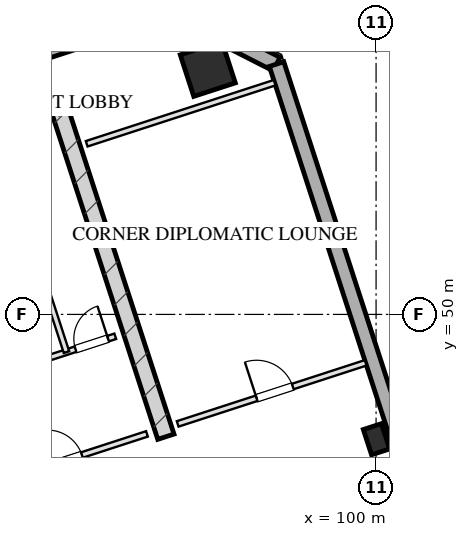
"""IFC4 building model, lengths in metres.
Left out: names, types, materials, properties, quantities, classifications, styles, units other than length and angle.
Written with IfcOpenShell. Run it as: python <this file> out.ifc"""

import sys

from ifc_helpers import new_model, si_unit, direction, frame, frame_2d, origin, origin_2d, place, context, subcontext, project, spatial, rectangle, hollow_rectangle, extrude, element, fill, save


model = new_model("IFC4")
c1 = context("Model", 3, precision=1e-05, world=origin(), true_north=direction((0.0, 1.0)))
c2 = subcontext(c1, "Body", "Model", "MODEL_VIEW")
j1 = project(units=[si_unit("LENGTHUNIT", "METRE"), si_unit("PLANEANGLEUNIT", "RADIAN")], contexts=[c1])
p1 = place(None, origin())
s1 = spatial("IfcSite", under=j1, at=p1, CompositionType="ELEMENT")
p2 = place(p1, origin())
s2 = spatial("IfcBuilding", under=s1, at=p2, CompositionType="ELEMENT")
p3 = place(p2, frame((0.0, 0.0, 234.4)))
s3 = spatial("IfcBuildingStorey", under=s2, at=p3, CompositionType="ELEMENT", Elevation=234.4)
p4 = place(p3, frame((76.415, 50.489, 0.0), z_axis=(0.0, 0.0, 1.0), x_axis=(0.951056810414, 0.309016089169, 0.0)))
e1 = element("IfcWall", 1, at=p4, inside=s3, PredefinedType="SHEAR", context=c2, shape_type="SweptSolid", body=[
    extrude(rectangle(XDim=16.25, YDim=0.45, at=frame_2d((8.125, 0.0))), origin(), (0.0, 0.0, 1.0), 3.2),
])
p5 = place(p3, frame((94.469, 46.781, 0.0), z_axis=(0.0, 0.0, 1.0), x_axis=(-0.309004419953, 0.951060601881, 0.0)))
e2 = element("IfcWall", 2, at=p5, inside=s3, PredefinedType="SHEAR", context=c2, shape_type="SweptSolid", body=[
    extrude(rectangle(XDim=9.33, YDim=0.45, at=frame_2d((4.665, 0.0))), origin(), (0.0, 0.0, 1.0), 3.2),
])
p6 = place(p3, frame((95.572, 56.461, 0.0), z_axis=(0.0, 0.0, 1.0), x_axis=(0.951056516295, 0.309016994375, 0.0)))
e3 = element("IfcColumn", 3, at=p6, inside=s3, PredefinedType="COLUMN", context=c2, shape_type="SweptSolid", body=[
    extrude(hollow_rectangle(XDim=1.15, YDim=1.15, WallThickness=0.04, at=origin_2d()), origin(), (0.0, 0.0, 1.0), 3.201),
])
p7 = place(p3, frame((100.01, 46.716, 0.0), z_axis=(0.0, 0.0, 1.0), x_axis=(0.951056516295, 0.309016994375, 0.0)))
e4 = element("IfcColumn", 4, at=p7, inside=s3, PredefinedType="COLUMN", context=c2, shape_type="SweptSolid", body=[
    extrude(hollow_rectangle(XDim=0.5, YDim=0.7, WallThickness=0.025, at=origin_2d()), origin(), (0.0, 0.0, 1.0), 3.201),
])
p8 = place(p3, frame((72.165, 50.706, 0.0), z_axis=(0.0, 0.0, 1.0), x_axis=(0.951058012937, 0.309012388148, 0.0)))
e5 = element("IfcWall", 5, at=p8, inside=s3, PredefinedType="SOLIDWALL", context=c2, shape_type="SweptSolid", body=[
    extrude(rectangle(XDim=23.6, YDim=0.4, at=frame_2d((11.8, 0.0))), origin(), (0.0, 0.0, 1.0), 2.36),
])
p9 = place(p3, frame((94.61, 57.999, 0.0), z_axis=(0.0, 0.0, 1.0), x_axis=(0.890979603174, -0.454043331334, 0.0)))
e6 = element("IfcWall", 6, at=p9, inside=s3, PredefinedType="SOLIDWALL", context=c2, shape_type="SweptSolid", body=[
    extrude(rectangle(XDim=3.111, YDim=0.4, at=frame_2d((1.556, 0.0))), origin(), (0.0, 0.0, 1.0), 2.36),
])
p10 = place(p3, frame((97.382, 56.586, 0.0), z_axis=(0.0, 0.0, 1.0), x_axis=(0.309016491071, -0.951056679828, 0.0)))
e7 = element("IfcWall", 7, at=p10, inside=s3, PredefinedType="SOLIDWALL", context=c2, shape_type="SweptSolid", body=[
    extrude(rectangle(XDim=38.4, YDim=0.4, at=frame_2d((19.2, 0.0))), origin(), (0.0, 0.0, 1.0), 2.36),
])
p11 = place(p10, frame((24.625, 0.0, 0.75)))
e8 = element("IfcOpeningElement", 8, at=p11, cuts=e7, PredefinedType="OPENING", context=c2, shape_type="SweptSolid", body=[
    extrude(rectangle(XDim=1.95, YDim=1.21, at=frame_2d((0.975, 0.605))), frame((0.0, 0.21, 0.0), z_axis=(0.0, -1.0, 0.0), x_axis=(1.0, 0.0, 0.0)), (0.0, 0.0, 1.0), 0.42),
])
p12 = place(p10, frame((20.825, 0.0, 0.75)))
e9 = element("IfcOpeningElement", 9, at=p12, cuts=e7, PredefinedType="OPENING", context=c2, shape_type="SweptSolid", body=[
    extrude(rectangle(XDim=1.95, YDim=1.21, at=frame_2d((0.975, 0.605))), frame((0.0, 0.21, 0.0), z_axis=(0.0, -1.0, 0.0), x_axis=(1.0, 0.0, 0.0)), (0.0, 0.0, 1.0), 0.42),
])
p13 = place(p10, frame((15.625, 0.0, 0.75)))
e10 = element("IfcOpeningElement", 10, at=p13, cuts=e7, PredefinedType="OPENING", context=c2, shape_type="SweptSolid", body=[
    extrude(rectangle(XDim=1.95, YDim=1.21, at=frame_2d((0.975, 0.605))), frame((0.0, 0.21, 0.0), z_axis=(0.0, -1.0, 0.0), x_axis=(1.0, 0.0, 0.0)), (0.0, 0.0, 1.0), 0.42),
])
p14 = place(p10, frame((11.825, 0.0, 0.75)))
e11 = element("IfcOpeningElement", 11, at=p14, cuts=e7, PredefinedType="OPENING", context=c2, shape_type="SweptSolid", body=[
    extrude(rectangle(XDim=1.95, YDim=1.21, at=frame_2d((0.975, 0.605))), frame((0.0, 0.21, 0.0), z_axis=(0.0, -1.0, 0.0), x_axis=(1.0, 0.0, 0.0)), (0.0, 0.0, 1.0), 0.42),
])
p15 = place(p3, frame((90.928, 45.868, 0.0), z_axis=(0.0, 0.0, 1.0), x_axis=(0.951059297078, 0.309008435874, 0.0)))
e12 = element("IfcWall", 12, at=p15, inside=s3, PredefinedType="PARTITIONING", context=c2, shape_type="SweptSolid", body=[
    extrude(rectangle(XDim=3.2, YDim=0.15, at=frame_2d((1.6, 0.0))), origin(), (0.0, 0.0, 1.0), 2.925),
])
p16 = place(p15, frame((0.45, 0.0, 0.0)))
e13 = element("IfcOpeningElement", 13, at=p16, cuts=e12, PredefinedType="OPENING", context=c2, shape_type="SweptSolid", body=[
    extrude(rectangle(XDim=0.95, YDim=2.05, at=frame_2d((0.475, 1.025))), frame((0.0, 0.085, 0.0), z_axis=(0.0, -1.0, 0.0), x_axis=(1.0, 0.0, 0.0)), (0.0, 0.0, 1.0), 0.17),
])
p17 = place(p3, frame((90.094, 48.436, 0.0), z_axis=(0.0, 0.0, 1.0), x_axis=(0.951066581729, 0.308986014439, 0.0)))
e14 = element("IfcWall", 14, at=p17, inside=s3, PredefinedType="PARTITIONING", context=c2, shape_type="SweptSolid", body=[
    extrude(rectangle(XDim=3.2, YDim=0.15, at=frame_2d((1.6, 0.0))), origin(), (0.0, 0.0, 1.0), 2.925),
])
p18 = place(p17, frame((0.35, 0.0, 0.0)))
e15 = element("IfcOpeningElement", 15, at=p18, cuts=e14, PredefinedType="OPENING", context=c2, shape_type="SweptSolid", body=[
    extrude(rectangle(XDim=0.9, YDim=2.05, at=frame_2d((0.45, 1.025))), frame((0.0, 0.085, 0.0), z_axis=(0.0, -1.0, 0.0), x_axis=(1.0, 0.0, 0.0)), (0.0, 0.0, 1.0), 0.17),
])
p19 = place(p17, frame((2.1, 0.0, 0.0)))
e16 = element("IfcOpeningElement", 16, at=p19, cuts=e14, PredefinedType="OPENING", context=c2, shape_type="SweptSolid", body=[
    extrude(rectangle(XDim=0.9, YDim=2.05, at=frame_2d((0.45, 1.025))), frame((0.0, 0.085, 0.0), z_axis=(0.0, -1.0, 0.0), x_axis=(1.0, 0.0, 0.0)), (0.0, 0.0, 1.0), 0.17),
])
p20 = place(p3, frame((91.853, 49.007, 0.0), z_axis=(0.0, 0.0, 1.0), x_axis=(-0.309022487551, 0.951054731437, 0.0)))
e17 = element("IfcWall", 17, at=p20, inside=s3, PredefinedType="PARTITIONING", context=c2, shape_type="SweptSolid", body=[
    extrude(rectangle(XDim=5.73, YDim=0.15, at=frame_2d((2.865, 0.0))), origin(), (0.0, 0.0, 1.0), 2.925),
])
p21 = place(p3, frame((92.385, 54.49, 0.0), z_axis=(0.0, 0.0, 1.0), x_axis=(0.951055112834, 0.309021313752, 0.0)))
e18 = element("IfcWall", 18, at=p21, inside=s3, PredefinedType="PARTITIONING", context=c2, shape_type="SweptSolid", body=[
    extrude(rectangle(XDim=5.2, YDim=0.15, at=frame_2d((2.6, 0.0))), origin(), (0.0, 0.0, 1.0), 2.925),
])
p22 = place(p3, frame((94.78, 47.119, 0.0), z_axis=(0.0, 0.0, 1.0), x_axis=(0.951055112834, 0.309021313752, 0.0)))
e19 = element("IfcWall", 19, at=p22, inside=s3, PredefinedType="PARTITIONING", context=c2, shape_type="SweptSolid", body=[
    extrude(rectangle(XDim=5.2, YDim=0.15, at=frame_2d((2.6, 0.0))), origin(), (0.0, 0.0, 1.0), 2.925),
])
p23 = place(p22, frame((2.184, 0.0, 0.0)))
e20 = element("IfcOpeningElement", 20, at=p23, cuts=e19, PredefinedType="OPENING", context=c2, shape_type="SweptSolid", body=[
    extrude(rectangle(XDim=1.0, YDim=2.05, at=frame_2d((0.5, 1.025))), frame((0.0, 0.085, 0.0), z_axis=(0.0, -1.0, 0.0), x_axis=(1.0, 0.0, 0.0)), (0.0, 0.0, 1.0), 0.17),
])
p24 = place(p16, origin())
e21 = element("IfcDoor", 21, at=p24, inside=s3, OperationType="SINGLE_SWING_LEFT", PredefinedType="DOOR", context=c2, shape_type="SweptSolid", body=[
    extrude(rectangle(XDim=0.95, YDim=2.05, at=frame_2d((0.475, 1.025))), frame((0.0, 0.025, 0.0), z_axis=(0.0, -1.0, 0.0), x_axis=(1.0, 0.0, 0.0)), (0.0, 0.0, 1.0), 0.05),
])
fill(e13, e21)
p25 = place(p19, origin())
e22 = element("IfcDoor", 22, at=p25, inside=s3, OperationType="SINGLE_SWING_RIGHT", PredefinedType="DOOR", context=c2, shape_type="SweptSolid", body=[
    extrude(rectangle(XDim=0.9, YDim=2.05, at=frame_2d((0.45, 1.025))), frame((0.0, 0.025, 0.0), z_axis=(0.0, -1.0, 0.0), x_axis=(1.0, 0.0, 0.0)), (0.0, 0.0, 1.0), 0.05),
])
fill(e16, e22)
p26 = place(p23, origin())
e23 = element("IfcDoor", 23, at=p26, inside=s3, OperationType="SINGLE_SWING_LEFT", PredefinedType="DOOR", context=c2, shape_type="SweptSolid", body=[
    extrude(rectangle(XDim=1.0, YDim=2.05, at=frame_2d((0.5, 1.025))), frame((0.0, 0.025, 0.0), z_axis=(0.0, -1.0, 0.0), x_axis=(1.0, 0.0, 0.0)), (0.0, 0.0, 1.0), 0.05),
])
fill(e20, e23)
save(model, sys.argv[1])
